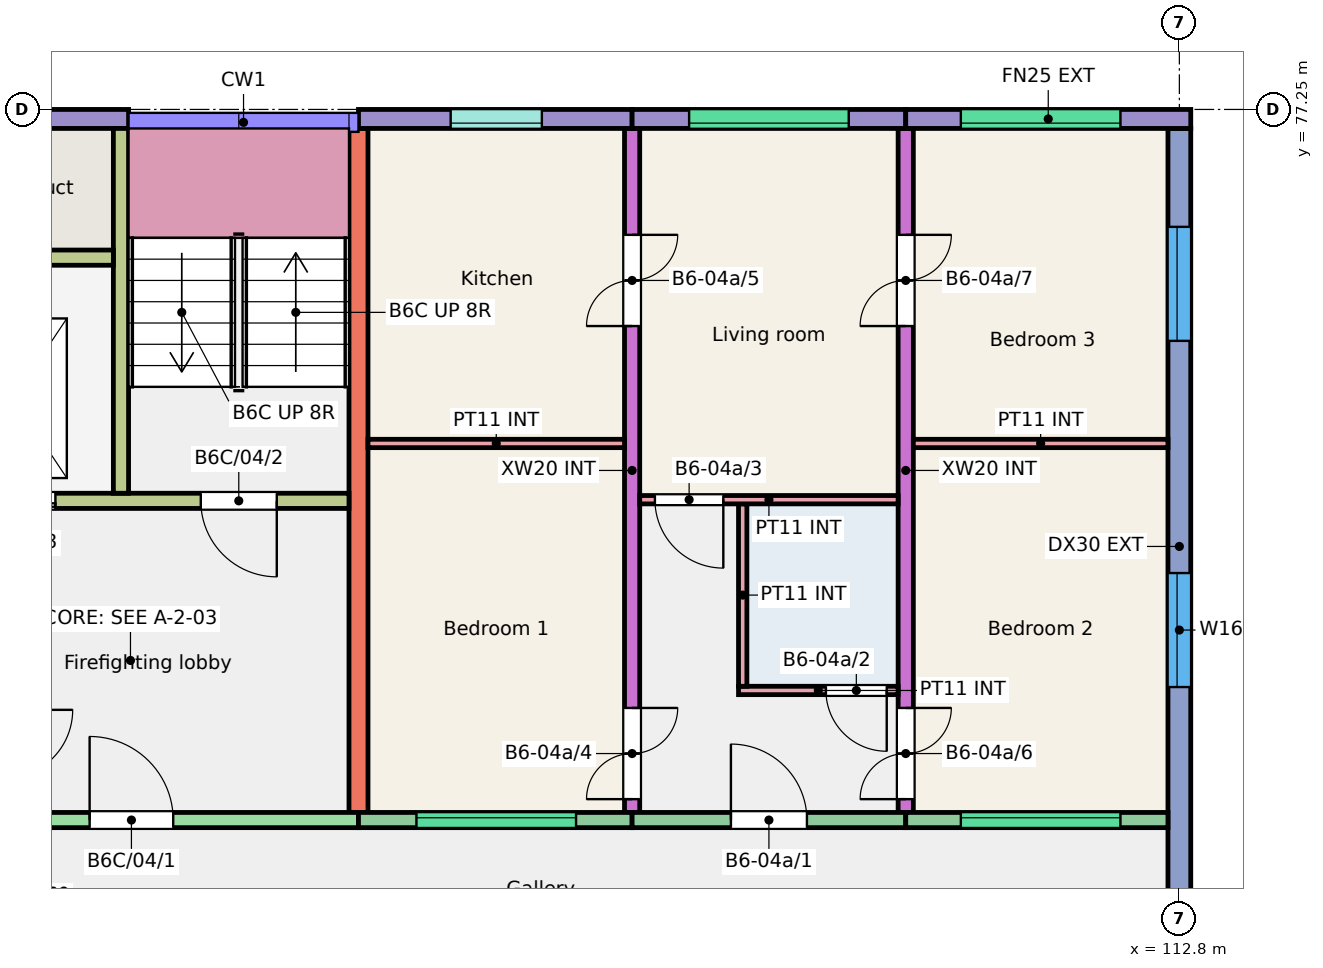
"""IFC4 building model, lengths in metres.
Left out: names, types, materials, properties, quantities, classifications, styles, units other than length and angle.
Written with IfcOpenShell. Run it as: python <this file> out.ifc"""

import sys

from ifc_helpers import new_model, si_unit, direction, frame, frame_2d, origin, place, context, subcontext, project, spatial, rectangle, extrude, element, fill, save


model = new_model("IFC4")
c1 = context("Model", 3, precision=1e-05, world=origin(), true_north=direction((0.0, 1.0)))
c2 = subcontext(c1, "Body", "Model", "MODEL_VIEW")
j1 = project(units=[si_unit("LENGTHUNIT", "METRE"), si_unit("PLANEANGLEUNIT", "RADIAN")], contexts=[c1])
p1 = place(None, origin())
s1 = spatial("IfcSite", under=j1, at=p1, CompositionType="ELEMENT")
p2 = place(p1, origin())
s2 = spatial("IfcBuilding", under=s1, at=p2, CompositionType="ELEMENT")
p3 = place(p2, frame((0.0, 0.0, 12.0)))
s3 = spatial("IfcBuildingStorey", under=s2, at=p3, CompositionType="ELEMENT", Elevation=12.0)
p4 = place(p3, frame((102.0, 68.0, 0.0), z_axis=(0.0, 0.0, 1.0), x_axis=(0.0, 1.0, 0.0)))
e1 = element("IfcWall", 1, at=p4, inside=s3, PredefinedType="SHEAR", context=c2, shape_type="SweptSolid", body=[
    extrude(rectangle(XDim=9.0, YDim=0.25, at=frame_2d((4.5, 0.0))), origin(), (0.0, 0.0, 1.0), 3.0),
])
p5 = place(p3, frame((105.6, 68.0, 0.0), z_axis=(0.0, 0.0, 1.0), x_axis=(0.0, 1.0, 0.0)))
e2 = element("IfcWall", 2, at=p5, inside=s3, PredefinedType="SHEAR", context=c2, shape_type="SweptSolid", body=[
    extrude(rectangle(XDim=9.0, YDim=0.2, at=frame_2d((4.5, 0.0))), origin(), (0.0, 0.0, 1.0), 3.0),
])
p6 = place(p5, frame((0.175, 0.0, 0.0)))
e3 = element("IfcOpeningElement", 3, at=p6, cuts=e2, PredefinedType="OPENING", context=c2, shape_type="SweptSolid", body=[
    extrude(rectangle(XDim=1.2, YDim=2.1, at=frame_2d((0.6, 1.05))), frame((0.0, 0.11, 0.0), z_axis=(0.0, -1.0, 0.0), x_axis=(1.0, 0.0, 0.0)), (0.0, 0.0, 1.0), 0.22),
])
p7 = place(p5, frame((6.4, 0.0, 0.0)))
e4 = element("IfcOpeningElement", 4, at=p7, cuts=e2, PredefinedType="OPENING", context=c2, shape_type="SweptSolid", body=[
    extrude(rectangle(XDim=1.2, YDim=2.1, at=frame_2d((0.6, 1.05))), frame((0.0, 0.11, 0.0), z_axis=(0.0, -1.0, 0.0), x_axis=(1.0, 0.0, 0.0)), (0.0, 0.0, 1.0), 0.22),
])
p8 = place(p3, frame((109.2, 68.0, 0.0), z_axis=(0.0, 0.0, 1.0), x_axis=(0.0, 1.0, 0.0)))
e5 = element("IfcWall", 5, at=p8, inside=s3, PredefinedType="SHEAR", context=c2, shape_type="SweptSolid", body=[
    extrude(rectangle(XDim=9.0, YDim=0.2, at=frame_2d((4.5, 0.0))), origin(), (0.0, 0.0, 1.0), 3.0),
])
p9 = place(p8, frame((0.175, 0.0, 0.0)))
e6 = element("IfcOpeningElement", 6, at=p9, cuts=e5, PredefinedType="OPENING", context=c2, shape_type="SweptSolid", body=[
    extrude(rectangle(XDim=1.2, YDim=2.1, at=frame_2d((0.6, 1.05))), frame((0.0, 0.11, 0.0), z_axis=(0.0, -1.0, 0.0), x_axis=(1.0, 0.0, 0.0)), (0.0, 0.0, 1.0), 0.22),
])
p10 = place(p8, frame((6.4, 0.0, 0.0)))
e7 = element("IfcOpeningElement", 7, at=p10, cuts=e5, PredefinedType="OPENING", context=c2, shape_type="SweptSolid", body=[
    extrude(rectangle(XDim=1.2, YDim=2.1, at=frame_2d((0.6, 1.05))), frame((0.0, 0.11, 0.0), z_axis=(0.0, -1.0, 0.0), x_axis=(1.0, 0.0, 0.0)), (0.0, 0.0, 1.0), 0.22),
])
p11 = place(p3, frame((112.8, 66.0, 0.0), z_axis=(0.0, 0.0, 1.0), x_axis=(0.0, 1.0, 0.0)))
e8 = element("IfcWall", 8, at=p11, inside=s3, PredefinedType="SHEAR", context=c2, shape_type="SweptSolid", body=[
    extrude(rectangle(XDim=11.0, YDim=0.3, at=frame_2d((5.5, 0.0))), origin(), (0.0, 0.0, 1.0), 3.0),
])
p12 = place(p11, frame((3.65, 0.0, 0.9)))
e9 = element("IfcOpeningElement", 9, at=p12, cuts=e8, PredefinedType="OPENING", context=c2, shape_type="SweptSolid", body=[
    extrude(rectangle(XDim=1.5, YDim=1.5, at=frame_2d((0.75, 0.75))), frame((0.0, 0.16, 0.0), z_axis=(0.0, -1.0, 0.0), x_axis=(1.0, 0.0, 0.0)), (0.0, 0.0, 1.0), 0.32),
])
p13 = place(p11, frame((8.205, 0.0, 0.9)))
e10 = element("IfcOpeningElement", 10, at=p13, cuts=e8, PredefinedType="OPENING", context=c2, shape_type="SweptSolid", body=[
    extrude(rectangle(XDim=1.5, YDim=1.5, at=frame_2d((0.75, 0.75))), frame((0.0, 0.16, 0.0), z_axis=(0.0, -1.0, 0.0), x_axis=(1.0, 0.0, 0.0)), (0.0, 0.0, 1.0), 0.32),
])
p14 = place(p3, frame((96.0, 77.125, 0.0), z_axis=(0.0, 0.0, 1.0), x_axis=(1.0, 0.0, 0.0)))
e11 = element("IfcWall", 11, at=p14, inside=s3, PredefinedType="SOLIDWALL", context=c2, shape_type="SweptSolid", body=[
    extrude(rectangle(XDim=2.975, YDim=0.25, at=frame_2d((1.488, 0.0))), origin(), (0.0, 0.0, 1.0), 3.0),
])
p15 = place(p3, frame((96.15, 67.9, 0.0), z_axis=(0.0, 0.0, 1.0), x_axis=(1.0, 0.0, 0.0)))
e12 = element("IfcWall", 12, at=p15, inside=s3, PredefinedType="SHEAR", context=c2, shape_type="SweptSolid", body=[
    extrude(rectangle(XDim=5.85, YDim=0.2, at=frame_2d((2.925, 0.0))), origin(), (0.0, 0.0, 1.0), 3.0),
])
p16 = place(p15, frame((2.312, 0.0, 0.0)))
e13 = element("IfcOpeningElement", 13, at=p16, cuts=e12, PredefinedType="OPENING", context=c2, shape_type="SweptSolid", body=[
    extrude(rectangle(XDim=1.1, YDim=2.1, at=frame_2d((0.55, 1.05))), frame((0.0, 0.11, 0.0), z_axis=(0.0, -1.0, 0.0), x_axis=(1.0, 0.0, 0.0)), (0.0, 0.0, 1.0), 0.22),
])
p17 = place(p3, frame((96.15, 72.1, 0.0), z_axis=(0.0, 0.0, 1.0), x_axis=(1.0, 0.0, 0.0)))
e14 = element("IfcWall", 14, at=p17, inside=s3, PredefinedType="SHEAR", context=c2, shape_type="SweptSolid", body=[
    extrude(rectangle(XDim=5.725, YDim=0.2, at=frame_2d((2.863, 0.0))), origin(), (0.0, 0.0, 1.0), 3.0),
])
p18 = place(p17, frame((3.775, 0.0, 0.0)))
e15 = element("IfcOpeningElement", 15, at=p18, cuts=e14, PredefinedType="OPENING", context=c2, shape_type="SweptSolid", body=[
    extrude(rectangle(XDim=1.0, YDim=2.1, at=frame_2d((0.5, 1.05))), frame((0.0, 0.11, 0.0), z_axis=(0.0, -1.0, 0.0), x_axis=(1.0, 0.0, 0.0)), (0.0, 0.0, 1.0), 0.22),
])
p19 = place(p17, frame((0.762, 0.0, 0.0)))
e16 = element("IfcOpeningElement", 16, at=p19, cuts=e14, PredefinedType="OPENING", context=c2, shape_type="SweptSolid", body=[
    extrude(rectangle(XDim=1.1, YDim=2.1, at=frame_2d((0.55, 1.05))), frame((0.0, 0.11, 0.0), z_axis=(0.0, -1.0, 0.0), x_axis=(1.0, 0.0, 0.0)), (0.0, 0.0, 1.0), 0.22),
])
p20 = place(p3, frame((98.875, 72.2, 0.0), z_axis=(0.0, 0.0, 1.0), x_axis=(0.0, 1.0, 0.0)))
e17 = element("IfcWall", 17, at=p20, inside=s3, PredefinedType="SHEAR", context=c2, shape_type="SweptSolid", body=[
    extrude(rectangle(XDim=4.8, YDim=0.2, at=frame_2d((2.4, 0.0))), origin(), (0.0, 0.0, 1.0), 3.0),
])
p21 = place(p3, frame((96.15, 75.3, 0.0), z_axis=(0.0, 0.0, 1.0), x_axis=(1.0, 0.0, 0.0)))
e18 = element("IfcWall", 18, at=p21, inside=s3, PredefinedType="SHEAR", context=c2, shape_type="SweptSolid", body=[
    extrude(rectangle(XDim=2.625, YDim=0.2, at=frame_2d((1.312, 0.0))), origin(), (0.0, 0.0, 1.0), 3.0),
])
p22 = place(p3, frame((102.0, 77.125, 0.0), z_axis=(0.0, 0.0, 1.0), x_axis=(1.0, 0.0, 0.0)))
e19 = element("IfcWall", 19, at=p22, inside=s3, PredefinedType="SOLIDWALL", context=c2, shape_type="SweptSolid", body=[
    extrude(rectangle(XDim=3.6, YDim=0.25, at=frame_2d((1.8, 0.0))), origin(), (0.0, 0.0, 1.0), 3.0),
])
p23 = place(p22, frame((1.212, 0.0, 1.1)))
e20 = element("IfcOpeningElement", 20, at=p23, cuts=e19, PredefinedType="OPENING", context=c2, shape_type="SweptSolid", body=[
    extrude(rectangle(XDim=1.2, YDim=1.3, at=frame_2d((0.6, 0.65))), frame((0.0, 0.135, 0.0), z_axis=(0.0, -1.0, 0.0), x_axis=(1.0, 0.0, 0.0)), (0.0, 0.0, 1.0), 0.27),
])
p24 = place(p3, frame((102.0, 67.9, 0.0), z_axis=(0.0, 0.0, 1.0), x_axis=(1.0, 0.0, 0.0)))
e21 = element("IfcWall", 21, at=p24, inside=s3, PredefinedType="SOLIDWALL", context=c2, shape_type="SweptSolid", body=[
    extrude(rectangle(XDim=3.6, YDim=0.2, at=frame_2d((1.8, 0.0))), origin(), (0.0, 0.0, 1.0), 3.0),
])
p25 = place(p24, frame((0.762, 0.0, 1.2)))
e22 = element("IfcOpeningElement", 22, at=p25, cuts=e21, PredefinedType="OPENING", context=c2, shape_type="SweptSolid", body=[
    extrude(rectangle(XDim=2.1, YDim=1.2, at=frame_2d((1.05, 0.6))), frame((0.0, 0.11, 0.0), z_axis=(0.0, -1.0, 0.0), x_axis=(1.0, 0.0, 0.0)), (0.0, 0.0, 1.0), 0.22),
])
p26 = place(p3, frame((105.6, 77.125, 0.0), z_axis=(0.0, 0.0, 1.0), x_axis=(1.0, 0.0, 0.0)))
e23 = element("IfcWall", 23, at=p26, inside=s3, PredefinedType="SOLIDWALL", context=c2, shape_type="SweptSolid", body=[
    extrude(rectangle(XDim=3.6, YDim=0.25, at=frame_2d((1.8, 0.0))), origin(), (0.0, 0.0, 1.0), 3.0),
])
p27 = place(p26, frame((0.75, 0.0, 1.2)))
e24 = element("IfcOpeningElement", 24, at=p27, cuts=e23, PredefinedType="OPENING", context=c2, shape_type="SweptSolid", body=[
    extrude(rectangle(XDim=2.1, YDim=1.2, at=frame_2d((1.05, 0.6))), frame((0.0, 0.135, 0.0), z_axis=(0.0, -1.0, 0.0), x_axis=(1.0, 0.0, 0.0)), (0.0, 0.0, 1.0), 0.27),
])
p28 = place(p3, frame((105.6, 67.9, 0.0), z_axis=(0.0, 0.0, 1.0), x_axis=(1.0, 0.0, 0.0)))
e25 = element("IfcWall", 25, at=p28, inside=s3, PredefinedType="SOLIDWALL", context=c2, shape_type="SweptSolid", body=[
    extrude(rectangle(XDim=3.6, YDim=0.2, at=frame_2d((1.8, 0.0))), origin(), (0.0, 0.0, 1.0), 3.0),
])
p29 = place(p28, frame((1.3, 0.0, 0.0)))
e26 = element("IfcOpeningElement", 26, at=p29, cuts=e25, PredefinedType="OPENING", context=c2, shape_type="SweptSolid", body=[
    extrude(rectangle(XDim=1.0, YDim=2.1, at=frame_2d((0.5, 1.05))), frame((0.0, 0.11, 0.0), z_axis=(0.0, -1.0, 0.0), x_axis=(1.0, 0.0, 0.0)), (0.0, 0.0, 1.0), 0.22),
])
p30 = place(p3, frame((109.2, 77.125, 0.0), z_axis=(0.0, 0.0, 1.0), x_axis=(1.0, 0.0, 0.0)))
e27 = element("IfcWall", 27, at=p30, inside=s3, PredefinedType="SOLIDWALL", context=c2, shape_type="SweptSolid", body=[
    extrude(rectangle(XDim=3.75, YDim=0.25, at=frame_2d((1.875, 0.0))), origin(), (0.0, 0.0, 1.0), 3.0),
])
p31 = place(p30, frame((0.725, 0.0, 1.2)))
e28 = element("IfcOpeningElement", 28, at=p31, cuts=e27, PredefinedType="OPENING", context=c2, shape_type="SweptSolid", body=[
    extrude(rectangle(XDim=2.1, YDim=1.2, at=frame_2d((1.05, 0.6))), frame((0.0, 0.135, 0.0), z_axis=(0.0, -1.0, 0.0), x_axis=(1.0, 0.0, 0.0)), (0.0, 0.0, 1.0), 0.27),
])
p32 = place(p3, frame((109.2, 67.9, 0.0), z_axis=(0.0, 0.0, 1.0), x_axis=(1.0, 0.0, 0.0)))
e29 = element("IfcWall", 29, at=p32, inside=s3, PredefinedType="SOLIDWALL", context=c2, shape_type="SweptSolid", body=[
    extrude(rectangle(XDim=3.45, YDim=0.2, at=frame_2d((1.725, 0.0))), origin(), (0.0, 0.0, 1.0), 3.0),
])
p33 = place(p32, frame((0.725, 0.0, 1.2)))
e30 = element("IfcOpeningElement", 30, at=p33, cuts=e29, PredefinedType="OPENING", context=c2, shape_type="SweptSolid", body=[
    extrude(rectangle(XDim=2.1, YDim=1.2, at=frame_2d((1.05, 0.6))), frame((0.0, 0.11, 0.0), z_axis=(0.0, -1.0, 0.0), x_axis=(1.0, 0.0, 0.0)), (0.0, 0.0, 1.0), 0.22),
])
p34 = place(p3, frame((107.0, 69.605, 0.0), z_axis=(0.0, 0.0, 1.0), x_axis=(1.0, 0.0, 0.0)))
e31 = element("IfcWall", 31, at=p34, inside=s3, PredefinedType="PARTITIONING", context=c2, shape_type="SweptSolid", body=[
    extrude(rectangle(XDim=2.1, YDim=0.11, at=frame_2d((1.05, 0.0))), origin(), (0.0, 0.0, 1.0), 2.8),
])
p35 = place(p34, frame((1.15, 0.0, 0.0)))
e32 = element("IfcOpeningElement", 32, at=p35, cuts=e31, PredefinedType="OPENING", context=c2, shape_type="SweptSolid", body=[
    extrude(rectangle(XDim=0.8, YDim=2.1, at=frame_2d((0.4, 1.05))), frame((0.0, 0.065, 0.0), z_axis=(0.0, -1.0, 0.0), x_axis=(1.0, 0.0, 0.0)), (0.0, 0.0, 1.0), 0.13),
])
p36 = place(p3, frame((107.055, 69.66, 0.0), z_axis=(0.0, 0.0, 1.0), x_axis=(0.0, 1.0, 0.0)))
e33 = element("IfcWall", 33, at=p36, inside=s3, PredefinedType="PARTITIONING", context=c2, shape_type="SweptSolid", body=[
    extrude(rectangle(XDim=2.4, YDim=0.11, at=frame_2d((1.2, 0.0))), origin(), (0.0, 0.0, 1.0), 2.8),
])
p37 = place(p3, frame((105.7, 72.115, 0.0), z_axis=(0.0, 0.0, 1.0), x_axis=(1.0, 0.0, 0.0)))
e34 = element("IfcWall", 34, at=p37, inside=s3, PredefinedType="PARTITIONING", context=c2, shape_type="SweptSolid", body=[
    extrude(rectangle(XDim=3.4, YDim=0.11, at=frame_2d((1.7, 0.0))), origin(), (0.0, 0.0, 1.0), 2.8),
])
p38 = place(p37, frame((0.2, 0.0, 0.0)))
e35 = element("IfcOpeningElement", 35, at=p38, cuts=e34, PredefinedType="OPENING", context=c2, shape_type="SweptSolid", body=[
    extrude(rectangle(XDim=0.9, YDim=2.1, at=frame_2d((0.45, 1.05))), frame((0.0, 0.065, 0.0), z_axis=(0.0, -1.0, 0.0), x_axis=(1.0, 0.0, 0.0)), (0.0, 0.0, 1.0), 0.13),
])
p39 = place(p3, frame((102.125, 72.855, 0.0), z_axis=(0.0, 0.0, 1.0), x_axis=(1.0, 0.0, 0.0)))
e36 = element("IfcWall", 36, at=p39, inside=s3, PredefinedType="PARTITIONING", context=c2, shape_type="SweptSolid", body=[
    extrude(rectangle(XDim=3.375, YDim=0.11, at=frame_2d((1.688, 0.0))), origin(), (0.0, 0.0, 1.0), 2.8),
])
p40 = place(p3, frame((109.3, 72.855, 0.0), z_axis=(0.0, 0.0, 1.0), x_axis=(1.0, 0.0, 0.0)))
e37 = element("IfcWall", 37, at=p40, inside=s3, PredefinedType="PARTITIONING", context=c2, shape_type="SweptSolid", body=[
    extrude(rectangle(XDim=3.35, YDim=0.11, at=frame_2d((1.675, 0.0))), origin(), (0.0, 0.0, 1.0), 2.8),
])
p41 = place(p25, origin())
e38 = element("IfcWindow", 38, at=p41, inside=s3, PartitioningType="SINGLE_PANEL", PredefinedType="WINDOW", context=c2, shape_type="SweptSolid", body=[
    extrude(rectangle(XDim=2.1, YDim=1.2, at=frame_2d((1.05, 0.6))), frame((0.0, 0.06, 0.0), z_axis=(0.0, -1.0, 0.0), x_axis=(1.0, 0.0, 0.0)), (0.0, 0.0, 1.0), 0.06),
])
fill(e22, e38)
p42 = place(p23, origin())
e39 = element("IfcWindow", 39, at=p42, inside=s3, PartitioningType="SINGLE_PANEL", PredefinedType="WINDOW", context=c2, shape_type="SweptSolid", body=[
    extrude(rectangle(XDim=1.2, YDim=1.3, at=frame_2d((0.6, 0.65))), frame((0.0, -0.025, 0.0), z_axis=(0.0, -1.0, 0.0), x_axis=(1.0, 0.0, 0.0)), (0.0, 0.0, 1.0), 0.06),
])
fill(e20, e39)
p43 = place(p33, origin())
e40 = element("IfcWindow", 40, at=p43, inside=s3, PartitioningType="SINGLE_PANEL", PredefinedType="WINDOW", context=c2, shape_type="SweptSolid", body=[
    extrude(rectangle(XDim=2.1, YDim=1.2, at=frame_2d((1.05, 0.6))), frame((0.0, 0.06, 0.0), z_axis=(0.0, -1.0, 0.0), x_axis=(1.0, 0.0, 0.0)), (0.0, 0.0, 1.0), 0.06),
])
fill(e30, e40)
p44 = place(p31, origin())
e41 = element("IfcWindow", 41, at=p44, inside=s3, PartitioningType="SINGLE_PANEL", PredefinedType="WINDOW", context=c2, shape_type="SweptSolid", body=[
    extrude(rectangle(XDim=2.1, YDim=1.2, at=frame_2d((1.05, 0.6))), frame((0.0, -0.025, 0.0), z_axis=(0.0, -1.0, 0.0), x_axis=(1.0, 0.0, 0.0)), (0.0, 0.0, 1.0), 0.06),
])
fill(e28, e41)
p45 = place(p27, origin())
e42 = element("IfcWindow", 42, at=p45, inside=s3, PartitioningType="SINGLE_PANEL", PredefinedType="WINDOW", context=c2, shape_type="SweptSolid", body=[
    extrude(rectangle(XDim=2.1, YDim=1.2, at=frame_2d((1.05, 0.6))), frame((0.0, -0.025, 0.0), z_axis=(0.0, -1.0, 0.0), x_axis=(1.0, 0.0, 0.0)), (0.0, 0.0, 1.0), 0.06),
])
fill(e24, e42)
p46 = place(p12, origin())
e43 = element("IfcWindow", 43, at=p46, inside=s3, PartitioningType="SINGLE_PANEL", PredefinedType="WINDOW", context=c2, shape_type="SweptSolid", body=[
    extrude(rectangle(XDim=1.5, YDim=1.5, at=frame_2d((0.75, 0.75))), frame((0.0, 0.06, 0.0), z_axis=(0.0, -1.0, 0.0), x_axis=(1.0, 0.0, 0.0)), (0.0, 0.0, 1.0), 0.06),
])
fill(e9, e43)
p47 = place(p13, origin())
e44 = element("IfcWindow", 44, at=p47, inside=s3, PartitioningType="SINGLE_PANEL", PredefinedType="WINDOW", context=c2, shape_type="SweptSolid", body=[
    extrude(rectangle(XDim=1.5, YDim=1.5, at=frame_2d((0.75, 0.75))), frame((0.0, 0.06, 0.0), z_axis=(0.0, -1.0, 0.0), x_axis=(1.0, 0.0, 0.0)), (0.0, 0.0, 1.0), 0.06),
])
fill(e10, e44)
p48 = place(p29, origin())
e45 = element("IfcDoor", 45, at=p48, inside=s3, OperationType="SINGLE_SWING_LEFT", PredefinedType="DOOR", context=c2, shape_type="SweptSolid", body=[
    extrude(rectangle(XDim=1.0, YDim=2.1, at=frame_2d((0.5, 1.05))), frame((0.0, 0.025, 0.0), z_axis=(0.0, -1.0, 0.0), x_axis=(1.0, 0.0, 0.0)), (0.0, 0.0, 1.0), 0.05),
])
fill(e26, e45)
p49 = place(p35, origin())
e46 = element("IfcDoor", 46, at=p49, inside=s3, OperationType="SINGLE_SWING_RIGHT", PredefinedType="DOOR", context=c2, shape_type="SweptSolid", body=[
    extrude(rectangle(XDim=0.8, YDim=2.1, at=frame_2d((0.4, 1.05))), frame((0.0, 0.025, 0.0), z_axis=(0.0, -1.0, 0.0), x_axis=(1.0, 0.0, 0.0)), (0.0, 0.0, 1.0), 0.05),
])
fill(e32, e46)
p50 = place(p38, origin())
e47 = element("IfcDoor", 47, at=p50, inside=s3, OperationType="SINGLE_SWING_RIGHT", PredefinedType="DOOR", context=c2, shape_type="SweptSolid", body=[
    extrude(rectangle(XDim=0.9, YDim=2.1, at=frame_2d((0.45, 1.05))), frame((0.0, 0.025, 0.0), z_axis=(0.0, -1.0, 0.0), x_axis=(1.0, 0.0, 0.0)), (0.0, 0.0, 1.0), 0.05),
])
fill(e35, e47)
p51 = place(p6, origin())
e48 = element("IfcDoor", 48, at=p51, inside=s3, OperationType="DOUBLE_DOOR_SINGLE_SWING", PredefinedType="DOOR", context=c2, shape_type="SweptSolid", body=[
    extrude(rectangle(XDim=1.2, YDim=2.1, at=frame_2d((0.6, 1.05))), frame((0.0, 0.025, 0.0), z_axis=(0.0, -1.0, 0.0), x_axis=(1.0, 0.0, 0.0)), (0.0, 0.0, 1.0), 0.05),
])
fill(e3, e48)
p52 = place(p7, origin())
e49 = element("IfcDoor", 49, at=p52, inside=s3, OperationType="DOUBLE_DOOR_SINGLE_SWING", PredefinedType="DOOR", context=c2, shape_type="SweptSolid", body=[
    extrude(rectangle(XDim=1.2, YDim=2.1, at=frame_2d((0.6, 1.05))), frame((0.0, 0.025, 0.0), z_axis=(0.0, -1.0, 0.0), x_axis=(1.0, 0.0, 0.0)), (0.0, 0.0, 1.0), 0.05),
])
fill(e4, e49)
p53 = place(p9, origin())
e50 = element("IfcDoor", 50, at=p53, inside=s3, OperationType="DOUBLE_DOOR_SINGLE_SWING", PredefinedType="DOOR", context=c2, shape_type="SweptSolid", body=[
    extrude(rectangle(XDim=1.2, YDim=2.1, at=frame_2d((0.6, 1.05))), frame((0.0, 0.025, 0.0), z_axis=(0.0, -1.0, 0.0), x_axis=(1.0, 0.0, 0.0)), (0.0, 0.0, 1.0), 0.05),
])
fill(e6, e50)
p54 = place(p10, origin())
e51 = element("IfcDoor", 51, at=p54, inside=s3, OperationType="DOUBLE_DOOR_SINGLE_SWING", PredefinedType="DOOR", context=c2, shape_type="SweptSolid", body=[
    extrude(rectangle(XDim=1.2, YDim=2.1, at=frame_2d((0.6, 1.05))), frame((0.0, 0.025, 0.0), z_axis=(0.0, -1.0, 0.0), x_axis=(1.0, 0.0, 0.0)), (0.0, 0.0, 1.0), 0.05),
])
fill(e7, e51)
p55 = place(p16, origin())
e52 = element("IfcDoor", 52, at=p55, inside=s3, OperationType="SINGLE_SWING_LEFT", PredefinedType="DOOR", context=c2, shape_type="SweptSolid", body=[
    extrude(rectangle(XDim=1.1, YDim=2.1, at=frame_2d((0.55, 1.05))), frame((0.0, 0.025, 0.0), z_axis=(0.0, -1.0, 0.0), x_axis=(1.0, 0.0, 0.0)), (0.0, 0.0, 1.0), 0.05),
])
fill(e13, e52)
p56 = place(p18, origin())
e53 = element("IfcDoor", 53, at=p56, inside=s3, OperationType="SINGLE_SWING_RIGHT", PredefinedType="DOOR", context=c2, shape_type="SweptSolid", body=[
    extrude(rectangle(XDim=1.0, YDim=2.1, at=frame_2d((0.5, 1.05))), frame((0.0, 0.025, 0.0), z_axis=(0.0, -1.0, 0.0), x_axis=(1.0, 0.0, 0.0)), (0.0, 0.0, 1.0), 0.05),
])
fill(e15, e53)
p57 = place(p19, origin())
e54 = element("IfcDoor", 54, at=p57, inside=s3, OperationType="DOUBLE_DOOR_SLIDING", PredefinedType="DOOR", context=c2, shape_type="SweptSolid", body=[
    extrude(rectangle(XDim=1.1, YDim=2.1, at=frame_2d((0.55, 1.05))), frame((0.0, 0.025, 0.0), z_axis=(0.0, -1.0, 0.0), x_axis=(1.0, 0.0, 0.0)), (0.0, 0.0, 1.0), 0.05),
])
fill(e16, e54)
save(model, sys.argv[1])
